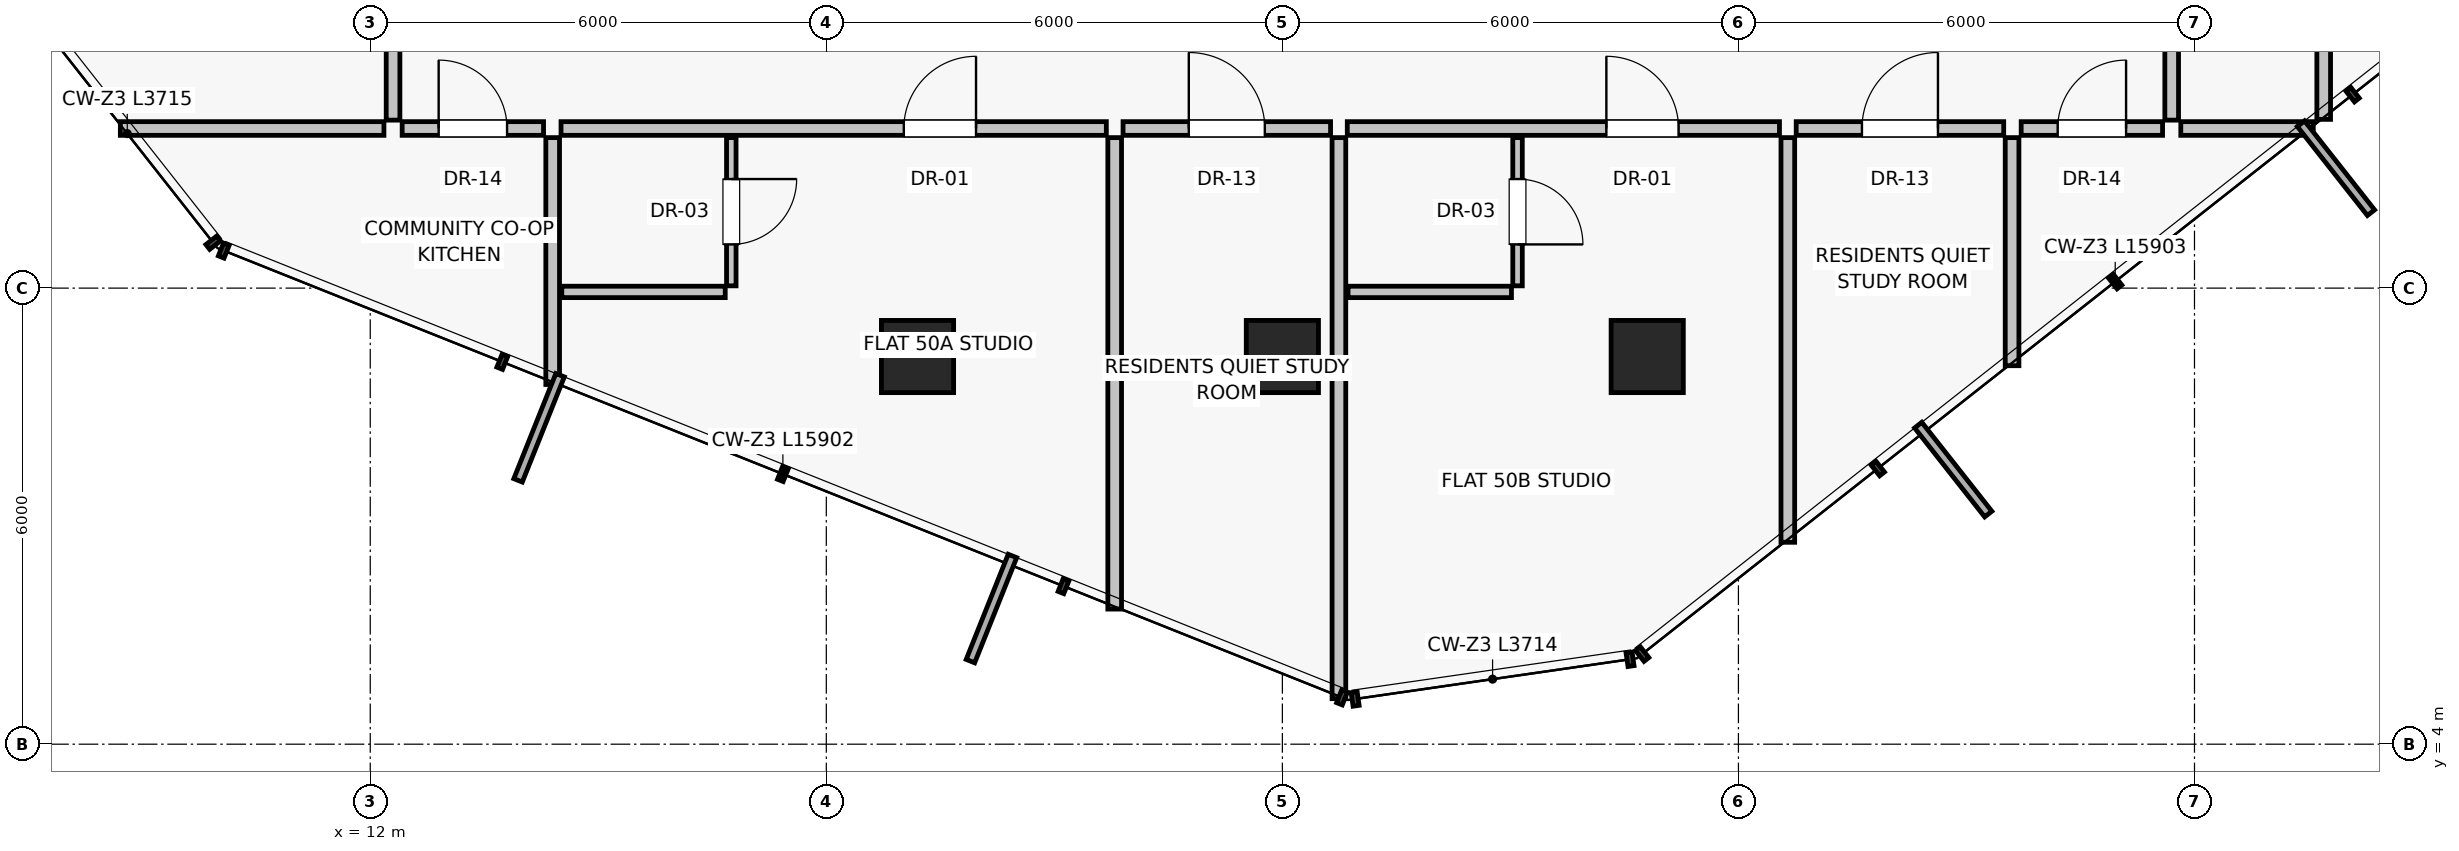
"""IFC4 building model, lengths in metres.
Left out: names, types, materials, properties, quantities, classifications, styles, units other than length and angle.
Written with IfcOpenShell. Run it as: python <this file> out.ifc"""

import sys

from ifc_helpers import new_model, si_unit, direction, frame, frame_2d, origin, origin_2d, place, context, subcontext, project, spatial, rectangle, extrude, source, transform, mapped, element, fill, save


model = new_model("IFC4")
c1 = context("Model", 3, precision=1e-05, world=origin(), true_north=direction((0.0, 1.0)))
c2 = subcontext(c1, "Body", "Model", "MODEL_VIEW")
j1 = project(units=[si_unit("LENGTHUNIT", "METRE"), si_unit("PLANEANGLEUNIT", "RADIAN")], contexts=[c1])
p1 = place(None, origin())
s1 = spatial("IfcSite", under=j1, at=p1, CompositionType="ELEMENT")
p2 = place(p1, origin())
s2 = spatial("IfcBuilding", under=s1, at=p2, CompositionType="ELEMENT")
p3 = place(p2, frame((0.0, 0.0, 178.85)))
s3 = spatial("IfcBuildingStorey", under=s2, at=p3, CompositionType="ELEMENT", Elevation=178.85)
for number, where, z_axis, x_axis in (
    (1, (19.2, 9.1, 0.0), (0.0, 0.0, 1.0), (1.0, 0.0, 0.0)),
    (2, (24.0, 9.1, 0.0), (0.0, 0.0, 1.0), (1.0, 0.0, 0.0)),
    (3, (28.8, 9.1, 0.0), (0.0, 0.0, 1.0), (1.0, 0.0, 0.0)),
):
    element("IfcColumn", number, at=place(p3, frame(where, z_axis=z_axis, x_axis=x_axis)), inside=s3, PredefinedType="COLUMN", context=c2, shape_type="SweptSolid", body=[
        extrude(rectangle(XDim=0.95, YDim=0.95, at=origin_2d()), origin(), (0.0, 0.0, 1.0), 3.25),
    ])
p4 = place(p3, frame((14.4, 11.98, 0.0), z_axis=(0.0, 0.0, 1.0), x_axis=(0.0, -1.0, 0.0)))
e4 = element("IfcWall", 4, at=p4, inside=s3, PredefinedType="PARTITIONING", context=c2, shape_type="SweptSolid", body=[
    extrude(rectangle(XDim=3.248, YDim=0.18, at=frame_2d((1.624, 0.0))), origin(), (0.0, 0.0, 1.0), 3.015),
])
p5 = place(p3, frame((33.6, 11.98, 0.0), z_axis=(0.0, 0.0, 1.0), x_axis=(0.0, -1.0, 0.0)))
e5 = element("IfcWall", 5, at=p5, inside=s3, PredefinedType="PARTITIONING", context=c2, shape_type="SweptSolid", body=[
    extrude(rectangle(XDim=3.001, YDim=0.18, at=frame_2d((1.5, 0.0))), origin(), (0.0, 0.0, 1.0), 3.015),
])
p6 = place(p3, frame((21.904, 12.1, 0.0), z_axis=(0.0, 0.0, 1.0), x_axis=(1.0, 0.0, 0.0)))
e6 = element("IfcWall", 6, at=p6, inside=s3, PredefinedType="PARTITIONING", context=c2, shape_type="SweptSolid", body=[
    extrude(rectangle(XDim=2.73, YDim=0.18, at=frame_2d((1.365, 0.0))), origin(), (0.0, 0.0, 1.0), 3.015),
])
p7 = place(p6, frame((0.865, 0.0, 0.0)))
e7 = element("IfcOpeningElement", 7, at=p7, cuts=e6, PredefinedType="OPENING", context=c2, shape_type="SweptSolid", body=[
    extrude(rectangle(XDim=1.0, YDim=2.01, at=frame_2d((0.5, 1.005))), frame((0.0, 0.1, 0.0), z_axis=(0.0, -1.0, 0.0), x_axis=(1.0, 0.0, 0.0)), (0.0, 0.0, 1.0), 0.2),
])
p8 = place(p3, frame((21.794, 11.98, 0.0), z_axis=(0.0, 0.0, 1.0), x_axis=(0.0, -1.0, 0.0)))
e8 = element("IfcWall", 8, at=p8, inside=s3, PredefinedType="PARTITIONING", context=c2, shape_type="SweptSolid", body=[
    extrude(rectangle(XDim=6.202, YDim=0.18, at=frame_2d((3.101, 0.0))), origin(), (0.0, 0.0, 1.0), 3.015),
])
p9 = place(p3, frame((14.51, 12.1, 0.0), z_axis=(0.0, 0.0, 1.0), x_axis=(1.0, 0.0, 0.0)))
e9 = element("IfcWall", 9, at=p9, inside=s3, PredefinedType="PARTITIONING", context=c2, shape_type="SweptSolid", body=[
    extrude(rectangle(XDim=7.174, YDim=0.18, at=frame_2d((3.587, 0.0))), origin(), (0.0, 0.0, 1.0), 3.015),
])
p10 = place(p9, frame((4.51, 0.0, 0.0)))
e10 = element("IfcOpeningElement", 10, at=p10, cuts=e9, PredefinedType="OPENING", context=c2, shape_type="SweptSolid", body=[
    extrude(rectangle(XDim=0.95, YDim=2.02, at=frame_2d((0.475, 1.01))), frame((0.0, 0.1, 0.0), z_axis=(0.0, -1.0, 0.0), x_axis=(1.0, 0.0, 0.0)), (0.0, 0.0, 1.0), 0.2),
])
p11 = place(p3, frame((16.75, 11.98, 0.0), z_axis=(0.0, 0.0, 1.0), x_axis=(0.0, -1.0, 0.0)))
e11 = element("IfcWall", 11, at=p11, inside=s3, PredefinedType="PARTITIONING", context=c2, shape_type="SweptSolid", body=[
    extrude(rectangle(XDim=1.95, YDim=0.125, at=frame_2d((0.975, 0.0))), origin(), (0.0, 0.0, 1.0), 3.015),
])
p12 = place(p11, frame((0.545, 0.0, 0.0)))
e12 = element("IfcOpeningElement", 12, at=p12, cuts=e11, PredefinedType="OPENING", context=c2, shape_type="SweptSolid", body=[
    extrude(rectangle(XDim=0.86, YDim=2.01, at=frame_2d((0.43, 1.005))), frame((0.0, 0.073, 0.0), z_axis=(0.0, -1.0, 0.0), x_axis=(1.0, 0.0, 0.0)), (0.0, 0.0, 1.0), 0.145),
])
p13 = place(p3, frame((14.52, 9.95, 0.0), z_axis=(0.0, 0.0, 1.0), x_axis=(1.0, 0.0, 0.0)))
e13 = element("IfcWall", 13, at=p13, inside=s3, PredefinedType="PARTITIONING", context=c2, shape_type="SweptSolid", body=[
    extrude(rectangle(XDim=2.15, YDim=0.15, at=frame_2d((1.075, 0.0))), origin(), (0.0, 0.0, 1.0), 3.015),
])
p14 = place(p3, frame((24.744, 11.98, 0.0), z_axis=(0.0, 0.0, 1.0), x_axis=(0.0, -1.0, 0.0)))
e14 = element("IfcWall", 14, at=p14, inside=s3, PredefinedType="PARTITIONING", context=c2, shape_type="SweptSolid", body=[
    extrude(rectangle(XDim=7.381, YDim=0.18, at=frame_2d((3.69, 0.0))), origin(), (0.0, 0.0, 1.0), 3.015),
])
p15 = place(p3, frame((30.76, 12.1, 0.0), z_axis=(0.0, 0.0, 1.0), x_axis=(1.0, 0.0, 0.0)))
e15 = element("IfcWall", 15, at=p15, inside=s3, PredefinedType="PARTITIONING", context=c2, shape_type="SweptSolid", body=[
    extrude(rectangle(XDim=2.73, YDim=0.18, at=frame_2d((1.365, 0.0))), origin(), (0.0, 0.0, 1.0), 3.015),
])
p16 = place(p15, frame((0.865, 0.0, 0.0)))
e16 = element("IfcOpeningElement", 16, at=p16, cuts=e15, PredefinedType="OPENING", context=c2, shape_type="SweptSolid", body=[
    extrude(rectangle(XDim=1.0, YDim=2.01, at=frame_2d((0.5, 1.005))), frame((0.0, 0.1, 0.0), z_axis=(0.0, -1.0, 0.0), x_axis=(1.0, 0.0, 0.0)), (0.0, 0.0, 1.0), 0.2),
])
p17 = place(p3, frame((30.65, 11.98, 0.0), z_axis=(0.0, 0.0, 1.0), x_axis=(0.0, -1.0, 0.0)))
e17 = element("IfcWall", 17, at=p17, inside=s3, PredefinedType="PARTITIONING", context=c2, shape_type="SweptSolid", body=[
    extrude(rectangle(XDim=5.324, YDim=0.18, at=frame_2d((2.662, 0.0))), origin(), (0.0, 0.0, 1.0), 3.015),
])
p18 = place(p3, frame((24.854, 12.1, 0.0), z_axis=(0.0, 0.0, 1.0), x_axis=(1.0, 0.0, 0.0)))
e18 = element("IfcWall", 18, at=p18, inside=s3, PredefinedType="PARTITIONING", context=c2, shape_type="SweptSolid", body=[
    extrude(rectangle(XDim=5.686, YDim=0.18, at=frame_2d((2.843, 0.0))), origin(), (0.0, 0.0, 1.0), 3.015),
])
p19 = place(p18, frame((3.409, 0.0, 0.0)))
e19 = element("IfcOpeningElement", 19, at=p19, cuts=e18, PredefinedType="OPENING", context=c2, shape_type="SweptSolid", body=[
    extrude(rectangle(XDim=0.95, YDim=2.02, at=frame_2d((0.475, 1.01))), frame((0.0, 0.1, 0.0), z_axis=(0.0, -1.0, 0.0), x_axis=(1.0, 0.0, 0.0)), (0.0, 0.0, 1.0), 0.2),
])
p20 = place(p3, frame((27.094, 11.98, 0.0), z_axis=(0.0, 0.0, 1.0), x_axis=(0.0, -1.0, 0.0)))
e20 = element("IfcWall", 20, at=p20, inside=s3, PredefinedType="PARTITIONING", context=c2, shape_type="SweptSolid", body=[
    extrude(rectangle(XDim=1.95, YDim=0.125, at=frame_2d((0.975, 0.0))), origin(), (0.0, 0.0, 1.0), 3.015),
])
p21 = place(p20, frame((0.545, 0.0, 0.0)))
e21 = element("IfcOpeningElement", 21, at=p21, cuts=e20, PredefinedType="OPENING", context=c2, shape_type="SweptSolid", body=[
    extrude(rectangle(XDim=0.86, YDim=2.01, at=frame_2d((0.43, 1.005))), frame((0.0, 0.073, 0.0), z_axis=(0.0, -1.0, 0.0), x_axis=(1.0, 0.0, 0.0)), (0.0, 0.0, 1.0), 0.145),
])
p22 = place(p3, frame((24.864, 9.95, 0.0), z_axis=(0.0, 0.0, 1.0), x_axis=(1.0, 0.0, 0.0)))
e22 = element("IfcWall", 22, at=p22, inside=s3, PredefinedType="PARTITIONING", context=c2, shape_type="SweptSolid", body=[
    extrude(rectangle(XDim=2.15, YDim=0.15, at=frame_2d((1.075, 0.0))), origin(), (0.0, 0.0, 1.0), 3.015),
])
p23 = place(p3, frame((12.18, 12.1, 0.0), z_axis=(0.0, 0.0, 1.0), x_axis=(-1.0, 0.0, 0.0)))
e23 = element("IfcWall", 23, at=p23, inside=s3, PredefinedType="PARTITIONING", context=c2, shape_type="SweptSolid", body=[
    extrude(rectangle(XDim=3.468, YDim=0.18, at=frame_2d((1.734, 0.0))), origin(), (0.0, 0.0, 1.0), 3.015),
])
p24 = place(p3, frame((12.3, 12.21, 0.0), z_axis=(0.0, 0.0, 1.0), x_axis=(0.0, 1.0, 0.0)))
e24 = element("IfcWall", 24, at=p24, inside=s3, PredefinedType="PARTITIONING", context=c2, shape_type="SweptSolid", body=[
    extrude(rectangle(XDim=4.664, YDim=0.18, at=frame_2d((2.332, 0.0))), origin(), (0.0, 0.0, 1.0), 3.015),
])
p25 = place(p24, frame((1.832, 0.0, 0.0)))
e25 = element("IfcOpeningElement", 25, at=p25, cuts=e24, PredefinedType="OPENING", context=c2, shape_type="SweptSolid", body=[
    extrude(rectangle(XDim=1.0, YDim=2.01, at=frame_2d((0.5, 1.005))), frame((0.0, 0.1, 0.0), z_axis=(0.0, -1.0, 0.0), x_axis=(1.0, 0.0, 0.0)), (0.0, 0.0, 1.0), 0.2),
])
p26 = place(p3, frame((35.82, 12.1, 0.0), z_axis=(0.0, 0.0, 1.0), x_axis=(1.0, 0.0, 0.0)))
e26 = element("IfcWall", 26, at=p26, inside=s3, PredefinedType="PARTITIONING", context=c2, shape_type="SweptSolid", body=[
    extrude(rectangle(XDim=1.743, YDim=0.18, at=frame_2d((0.872, 0.0))), origin(), (0.0, 0.0, 1.0), 3.015),
])
p27 = place(p3, frame((35.7, 12.21, 0.0), z_axis=(0.0, 0.0, 1.0), x_axis=(0.0, 1.0, 0.0)))
e27 = element("IfcWall", 27, at=p27, inside=s3, PredefinedType="PARTITIONING", context=c2, shape_type="SweptSolid", body=[
    extrude(rectangle(XDim=6.88, YDim=0.18, at=frame_2d((3.44, 0.0))), origin(), (0.0, 0.0, 1.0), 3.015),
])
p28 = place(p27, frame((2.94, 0.0, 0.0)))
e28 = element("IfcOpeningElement", 28, at=p28, cuts=e27, PredefinedType="OPENING", context=c2, shape_type="SweptSolid", body=[
    extrude(rectangle(XDim=1.0, YDim=2.01, at=frame_2d((0.5, 1.005))), frame((0.0, 0.1, 0.0), z_axis=(0.0, -1.0, 0.0), x_axis=(1.0, 0.0, 0.0)), (0.0, 0.0, 1.0), 0.2),
])
p29 = place(p3, frame((37.7, 12.22, 0.0), z_axis=(0.0, 0.0, 1.0), x_axis=(0.0, 1.0, 0.0)))
e29 = element("IfcWall", 29, at=p29, inside=s3, PredefinedType="PARTITIONING", context=c2, shape_type="SweptSolid", body=[
    extrude(rectangle(XDim=6.88, YDim=0.18, at=frame_2d((3.44, 0.0))), origin(), (0.0, 0.0, 1.0), 3.015),
])
p30 = place(p3, frame((12.42, 12.1, 0.0), z_axis=(0.0, 0.0, 1.0), x_axis=(1.0, 0.0, 0.0)))
e30 = element("IfcWall", 30, at=p30, inside=s3, PredefinedType="PARTITIONING", context=c2, shape_type="SweptSolid", body=[
    extrude(rectangle(XDim=1.86, YDim=0.18, at=frame_2d((0.93, 0.0))), origin(), (0.0, 0.0, 1.0), 3.015),
])
p31 = place(p30, frame((0.48, 0.0, 0.0)))
e31 = element("IfcOpeningElement", 31, at=p31, cuts=e30, PredefinedType="OPENING", context=c2, shape_type="SweptSolid", body=[
    extrude(rectangle(XDim=0.9, YDim=2.01, at=frame_2d((0.45, 1.005))), frame((0.0, 0.1, 0.0), z_axis=(0.0, -1.0, 0.0), x_axis=(1.0, 0.0, 0.0)), (0.0, 0.0, 1.0), 0.2),
])
p32 = place(p3, frame((33.72, 12.1, 0.0), z_axis=(0.0, 0.0, 1.0), x_axis=(1.0, 0.0, 0.0)))
e32 = element("IfcWall", 32, at=p32, inside=s3, PredefinedType="PARTITIONING", context=c2, shape_type="SweptSolid", body=[
    extrude(rectangle(XDim=1.86, YDim=0.18, at=frame_2d((0.93, 0.0))), origin(), (0.0, 0.0, 1.0), 3.015),
])
p33 = place(p32, frame((0.48, 0.0, 0.0)))
e33 = element("IfcOpeningElement", 33, at=p33, cuts=e32, PredefinedType="OPENING", context=c2, shape_type="SweptSolid", body=[
    extrude(rectangle(XDim=0.9, YDim=2.01, at=frame_2d((0.45, 1.005))), frame((0.0, 0.1, 0.0), z_axis=(0.0, -1.0, 0.0), x_axis=(1.0, 0.0, 0.0)), (0.0, 0.0, 1.0), 0.2),
])
m1 = source(origin(), c2, "Body", "SweptSolid", [
    extrude(rectangle(XDim=1.0, YDim=2.01, at=frame_2d((0.5, 1.005))), frame((0.0, 0.025, 0.0), z_axis=(0.0, -1.0, 0.0), x_axis=(1.0, 0.0, 0.0)), (0.0, 0.0, 1.0), 0.05),
])
p34 = place(p7, origin())
e34 = element("IfcDoor", 34, at=p34, inside=s3, OperationType="SINGLE_SWING_LEFT", PredefinedType="DOOR", context=c2, shape_type="MappedRepresentation", body=[
    mapped(m1, transform((0.0, 0.0, 0.0), scale=1.0)),
])
fill(e7, e34)
m2 = source(origin(), c2, "Body", "SweptSolid", [
    extrude(rectangle(XDim=0.95, YDim=2.02, at=frame_2d((0.475, 1.01))), frame((0.0, 0.025, 0.0), z_axis=(0.0, -1.0, 0.0), x_axis=(1.0, 0.0, 0.0)), (0.0, 0.0, 1.0), 0.05),
])
p35 = place(p10, origin())
e35 = element("IfcDoor", 35, at=p35, inside=s3, OperationType="SINGLE_SWING_RIGHT", PredefinedType="DOOR", context=c2, shape_type="MappedRepresentation", body=[
    mapped(m2, transform((0.0, 0.0, 0.0), scale=1.0)),
])
fill(e10, e35)
m3 = source(origin(), c2, "Body", "SweptSolid", [
    extrude(rectangle(XDim=0.86, YDim=2.01, at=frame_2d((0.43, 1.005))), frame((0.0, 0.025, 0.0), z_axis=(0.0, -1.0, 0.0), x_axis=(1.0, 0.0, 0.0)), (0.0, 0.0, 1.0), 0.05),
])
p36 = place(p12, origin())
e36 = element("IfcDoor", 36, at=p36, inside=s3, OperationType="SINGLE_SWING_LEFT", PredefinedType="DOOR", context=c2, shape_type="MappedRepresentation", body=[
    mapped(m3, transform((0.0, 0.0, 0.0), scale=1.0)),
])
fill(e12, e36)
p37 = place(p16, origin())
e37 = element("IfcDoor", 37, at=p37, inside=s3, OperationType="SINGLE_SWING_RIGHT", PredefinedType="DOOR", context=c2, shape_type="MappedRepresentation", body=[
    mapped(m1, transform((0.0, 0.0, 0.0), scale=1.0)),
])
fill(e16, e37)
p38 = place(p19, origin())
e38 = element("IfcDoor", 38, at=p38, inside=s3, OperationType="SINGLE_SWING_LEFT", PredefinedType="DOOR", context=c2, shape_type="MappedRepresentation", body=[
    mapped(m2, transform((0.0, 0.0, 0.0), scale=1.0)),
])
fill(e19, e38)
p39 = place(p21, origin())
e39 = element("IfcDoor", 39, at=p39, inside=s3, OperationType="SINGLE_SWING_RIGHT", PredefinedType="DOOR", context=c2, shape_type="MappedRepresentation", body=[
    mapped(m3, transform((0.0, 0.0, 0.0), scale=1.0)),
])
fill(e21, e39)
m4 = source(origin(), c2, "Body", "SweptSolid", [
    extrude(rectangle(XDim=0.9, YDim=2.01, at=frame_2d((0.45, 1.005))), frame((0.0, 0.025, 0.0), z_axis=(0.0, -1.0, 0.0), x_axis=(1.0, 0.0, 0.0)), (0.0, 0.0, 1.0), 0.05),
])
p40 = place(p31, origin())
e40 = element("IfcDoor", 40, at=p40, inside=s3, OperationType="SINGLE_SWING_LEFT", PredefinedType="DOOR", context=c2, shape_type="MappedRepresentation", body=[
    mapped(m4, transform((0.0, 0.0, 0.0), scale=1.0)),
])
fill(e31, e40)
p41 = place(p33, origin())
e41 = element("IfcDoor", 41, at=p41, inside=s3, OperationType="SINGLE_SWING_RIGHT", PredefinedType="DOOR", context=c2, shape_type="MappedRepresentation", body=[
    mapped(m4, transform((0.0, 0.0, 0.0), scale=1.0)),
])
fill(e33, e41)
save(model, sys.argv[1])
